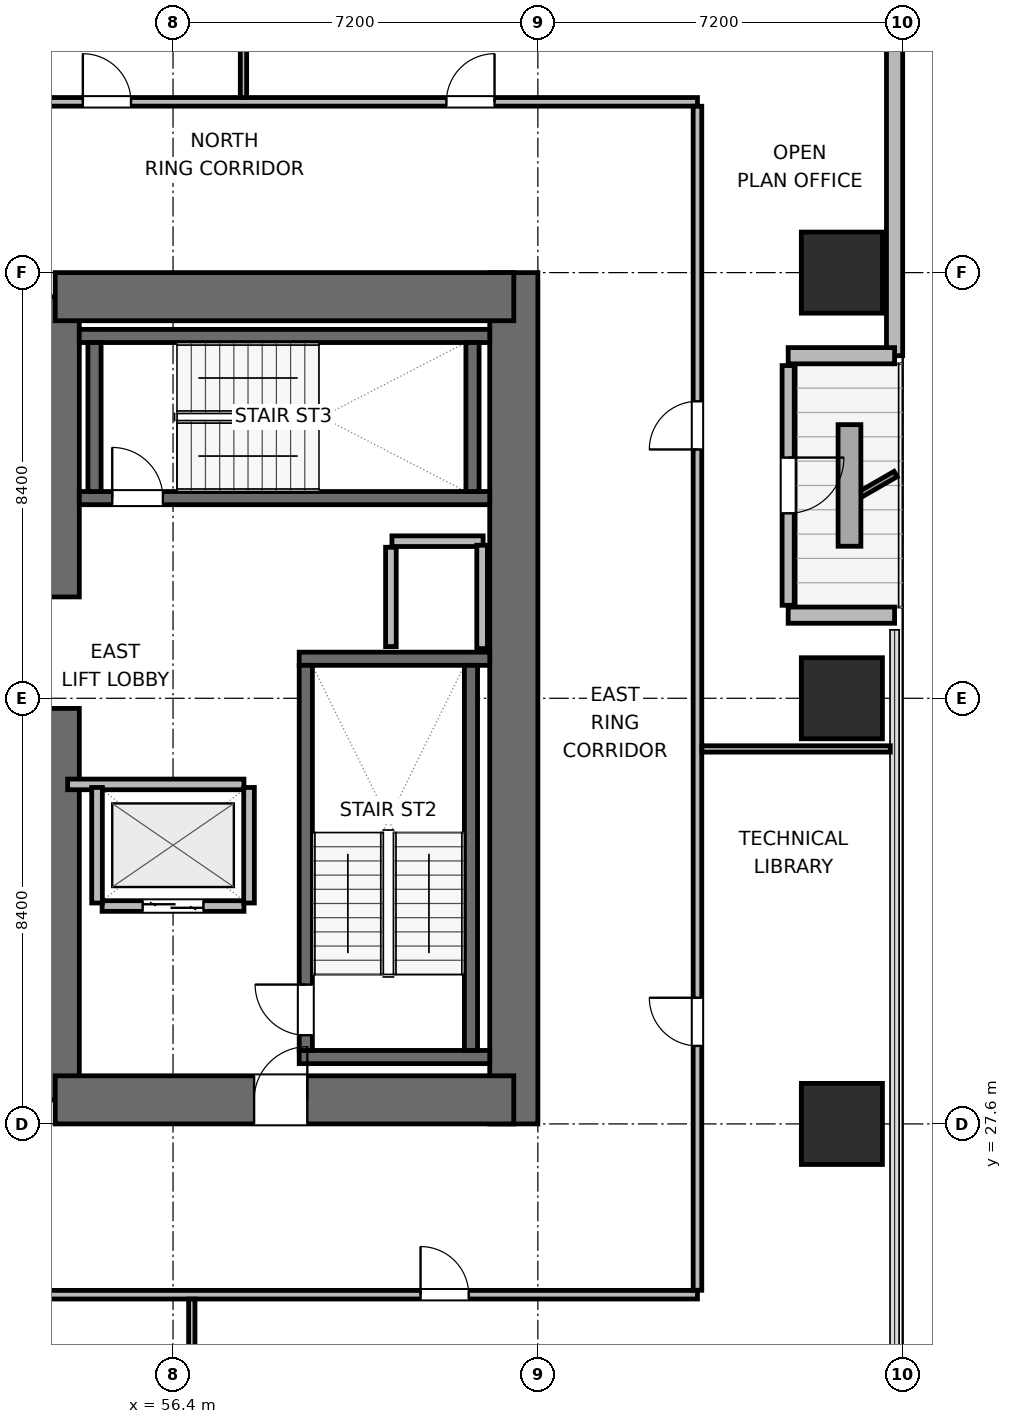
"""IFC4 building model, lengths in metres.
Left out: names, types, materials, properties, quantities, classifications, styles, units other than length and angle.
Written with IfcOpenShell. Run it as: python <this file> out.ifc"""

import sys

from ifc_helpers import new_model, si_unit, direction, frame, frame_2d, origin, origin_2d, place, context, subcontext, project, spatial, rectangle, extrude, element, fill, save


model = new_model("IFC4")
c1 = context("Model", 3, precision=1e-05, world=origin(), true_north=direction((0.0, 1.0)))
c2 = subcontext(c1, "Body", "Model", "MODEL_VIEW")
j1 = project(units=[si_unit("LENGTHUNIT", "METRE"), si_unit("PLANEANGLEUNIT", "RADIAN")], contexts=[c1])
p1 = place(None, origin())
s1 = spatial("IfcSite", under=j1, at=p1, CompositionType="ELEMENT")
p2 = place(p1, origin())
s2 = spatial("IfcBuilding", under=s1, at=p2, CompositionType="ELEMENT")
p3 = place(p2, frame((0.0, 0.0, 89.7)))
s3 = spatial("IfcBuildingStorey", under=s2, at=p3, CompositionType="ELEMENT", Elevation=89.7)
p4 = place(p3, frame((54.075, 28.075, 0.0), z_axis=(0.0, 0.0, 1.0), x_axis=(0.0, 1.0, 0.0)))
e1 = element("IfcWall", 1, at=p4, inside=s3, PredefinedType="SHEAR", context=c2, shape_type="SweptSolid", body=[
    extrude(rectangle(XDim=7.725, YDim=0.95, at=frame_2d((3.863, 0.0))), origin(), (0.0, 0.0, 1.0), 3.9),
])
p5 = place(p3, frame((54.075, 38.0, 0.0), z_axis=(0.0, 0.0, 1.0), x_axis=(0.0, 1.0, 0.0)))
e2 = element("IfcWall", 2, at=p5, inside=s3, PredefinedType="SHEAR", context=c2, shape_type="SweptSolid", body=[
    extrude(rectangle(XDim=5.925, YDim=0.95, at=frame_2d((2.962, 0.0))), origin(), (0.0, 0.0, 1.0), 3.9),
])
p6 = place(p3, frame((63.125, 27.6, 0.0), z_axis=(0.0, 0.0, 1.0), x_axis=(0.0, 1.0, 0.0)))
e3 = element("IfcWall", 3, at=p6, inside=s3, PredefinedType="SHEAR", context=c2, shape_type="SweptSolid", body=[
    extrude(rectangle(XDim=16.8, YDim=0.95, at=frame_2d((8.4, 0.0))), origin(), (0.0, 0.0, 1.0), 3.9),
])
p7 = place(p3, frame((54.075, 28.075, 0.0), z_axis=(0.0, 0.0, 1.0), x_axis=(1.0, 0.0, 0.0)))
e4 = element("IfcWall", 4, at=p7, inside=s3, PredefinedType="SHEAR", context=c2, shape_type="SweptSolid", body=[
    extrude(rectangle(XDim=9.05, YDim=0.95, at=frame_2d((4.525, 0.0))), origin(), (0.0, 0.0, 1.0), 3.9),
])
p8 = place(p7, frame((3.925, 0.0, 0.0)))
e5 = element("IfcOpeningElement", 5, at=p8, cuts=e4, PredefinedType="OPENING", context=c2, shape_type="SweptSolid", body=[
    extrude(rectangle(XDim=1.05, YDim=2.04, at=frame_2d((0.525, 1.02))), frame((0.0, 0.485, 0.0), z_axis=(0.0, -1.0, 0.0), x_axis=(1.0, 0.0, 0.0)), (0.0, 0.0, 1.0), 0.97),
])
p9 = place(p3, frame((54.075, 43.925, 0.0), z_axis=(0.0, 0.0, 1.0), x_axis=(1.0, 0.0, 0.0)))
e6 = element("IfcWall", 6, at=p9, inside=s3, PredefinedType="SHEAR", context=c2, shape_type="SweptSolid", body=[
    extrude(rectangle(XDim=9.05, YDim=0.95, at=frame_2d((4.525, 0.0))), origin(), (0.0, 0.0, 1.0), 3.9),
])
for number, where, z_axis, x_axis in (
    (7, (58.89, 28.92, 0.0), (0.0, 0.0, 1.0), (1.0, 0.0, 0.0)),
    (8, (58.89, 36.78, 0.0), (0.0, 0.0, 1.0), (1.0, 0.0, 0.0)),
):
    element("IfcWall", number, at=place(p3, frame(where, z_axis=z_axis, x_axis=x_axis)), inside=s3, PredefinedType="SHEAR", context=c2, shape_type="SweptSolid", body=[
        extrude(rectangle(XDim=3.76, YDim=0.26, at=frame_2d((1.88, 0.0))), origin(), (0.0, 0.0, 1.0), 3.9),
    ])
p10 = place(p3, frame((59.02, 29.05, 0.0), z_axis=(0.0, 0.0, 1.0), x_axis=(0.0, 1.0, 0.0)))
e9 = element("IfcWall", 9, at=p10, inside=s3, PredefinedType="SHEAR", context=c2, shape_type="SweptSolid", body=[
    extrude(rectangle(XDim=7.6, YDim=0.26, at=frame_2d((3.8, 0.0))), origin(), (0.0, 0.0, 1.0), 3.9),
])
p11 = place(p10, frame((0.3, 0.0, 0.0)))
e10 = element("IfcOpeningElement", 10, at=p11, cuts=e9, PredefinedType="OPENING", context=c2, shape_type="SweptSolid", body=[
    extrude(rectangle(XDim=1.0, YDim=2.04, at=frame_2d((0.5, 1.02))), frame((0.0, 0.14, 0.0), z_axis=(0.0, -1.0, 0.0), x_axis=(1.0, 0.0, 0.0)), (0.0, 0.0, 1.0), 0.28),
])
p12 = place(p3, frame((62.28, 29.05, 0.0), z_axis=(0.0, 0.0, 1.0), x_axis=(0.0, 1.0, 0.0)))
e11 = element("IfcWall", 11, at=p12, inside=s3, PredefinedType="SHEAR", context=c2, shape_type="SweptSolid", body=[
    extrude(rectangle(XDim=7.6, YDim=0.26, at=frame_2d((3.8, 0.0))), origin(), (0.0, 0.0, 1.0), 3.9),
])
p13 = place(p3, frame((54.55, 39.95, 0.0), z_axis=(0.0, 0.0, 1.0), x_axis=(1.0, 0.0, 0.0)))
e12 = element("IfcWall", 12, at=p13, inside=s3, PredefinedType="SHEAR", context=c2, shape_type="SweptSolid", body=[
    extrude(rectangle(XDim=8.1, YDim=0.26, at=frame_2d((4.05, 0.0))), origin(), (0.0, 0.0, 1.0), 3.9),
])
p14 = place(p13, frame((0.65, 0.0, 0.0)))
e13 = element("IfcOpeningElement", 13, at=p14, cuts=e12, PredefinedType="OPENING", context=c2, shape_type="SweptSolid", body=[
    extrude(rectangle(XDim=1.0, YDim=2.04, at=frame_2d((0.5, 1.02))), frame((0.0, 0.14, 0.0), z_axis=(0.0, -1.0, 0.0), x_axis=(1.0, 0.0, 0.0)), (0.0, 0.0, 1.0), 0.28),
])
p15 = place(p3, frame((54.55, 43.15, 0.0), z_axis=(0.0, 0.0, 1.0), x_axis=(1.0, 0.0, 0.0)))
e14 = element("IfcWall", 14, at=p15, inside=s3, PredefinedType="SHEAR", context=c2, shape_type="SweptSolid", body=[
    extrude(rectangle(XDim=8.1, YDim=0.26, at=frame_2d((4.05, 0.0))), origin(), (0.0, 0.0, 1.0), 3.9),
])
for number, where, z_axis, x_axis in (
    (15, (54.85, 40.08, 0.0), (0.0, 0.0, 1.0), (0.0, 1.0, 0.0)),
    (16, (62.31, 40.08, 0.0), (0.0, 0.0, 1.0), (0.0, 1.0, 0.0)),
):
    element("IfcWall", number, at=place(p3, frame(where, z_axis=z_axis, x_axis=x_axis)), inside=s3, PredefinedType="SHEAR", context=c2, shape_type="SweptSolid", body=[
        extrude(rectangle(XDim=2.94, YDim=0.26, at=frame_2d((1.47, 0.0))), origin(), (0.0, 0.0, 1.0), 3.9),
    ])
for number, where, z_axis, x_axis in (
    (17, (69.6, 27.6, 0.0), (0.0, 0.0, 1.0), (1.0, 0.0, 0.0)),
    (18, (69.6, 36.0, 0.0), (0.0, 0.0, 1.0), (1.0, 0.0, 0.0)),
    (19, (69.6, 44.4, 0.0), (0.0, 0.0, 1.0), (1.0, 0.0, 0.0)),
):
    element("IfcColumn", number, at=place(p3, frame(where, z_axis=z_axis, x_axis=x_axis)), inside=s3, PredefinedType="COLUMN", context=c2, shape_type="SweptSolid", body=[
        extrude(rectangle(XDim=1.6, YDim=1.6, at=origin_2d()), origin(), (0.0, 0.0, 1.0), 3.9),
    ])
p16 = place(p3, frame((70.64, 56.979, 0.0), z_axis=(0.0, 0.0, 1.0), x_axis=(0.0, -1.0, 0.0)))
e20 = element("IfcWall", 20, at=p16, inside=s3, PredefinedType="SOLIDWALL", context=c2, shape_type="SweptSolid", body=[
    extrude(rectangle(XDim=14.219, YDim=0.32, at=frame_2d((7.109, 0.0))), origin(), (0.0, 0.0, 1.0), 3.64),
])
p17 = place(p3, frame((70.64, 42.76, 0.0), z_axis=(0.0, 0.0, 1.0), x_axis=(-1.0, 0.0, 0.0)))
e21 = element("IfcWall", 21, at=p17, inside=s3, PredefinedType="SOLIDWALL", context=c2, shape_type="SweptSolid", body=[
    extrude(rectangle(XDim=2.1, YDim=0.32, at=frame_2d((1.05, 0.0))), origin(), (0.0, 0.0, 1.0), 2.875),
])
p18 = place(p3, frame((68.54, 42.565, 0.0), z_axis=(0.0, 0.0, 1.0), x_axis=(0.0, -1.0, 0.0)))
e22 = element("IfcWall", 22, at=p18, inside=s3, PredefinedType="SOLIDWALL", context=c2, shape_type="SweptSolid", body=[
    extrude(rectangle(XDim=4.73, YDim=0.24, at=frame_2d((2.365, 0.0))), origin(), (0.0, 0.0, 1.0), 3.162),
])
p19 = place(p18, frame((1.815, 0.0, 0.0)))
e23 = element("IfcOpeningElement", 23, at=p19, cuts=e22, PredefinedType="OPENING", context=c2, shape_type="SweptSolid", body=[
    extrude(rectangle(XDim=1.1, YDim=2.04, at=frame_2d((0.55, 1.02))), frame((0.0, 0.13, 0.0), z_axis=(0.0, -1.0, 0.0), x_axis=(1.0, 0.0, 0.0)), (0.0, 0.0, 1.0), 0.26),
])
p20 = place(p3, frame((68.54, 37.64, 0.0), z_axis=(0.0, 0.0, 1.0), x_axis=(1.0, 0.0, 0.0)))
e24 = element("IfcWall", 24, at=p20, inside=s3, PredefinedType="SOLIDWALL", context=c2, shape_type="SweptSolid", body=[
    extrude(rectangle(XDim=2.1, YDim=0.32, at=frame_2d((1.05, 0.0))), origin(), (0.0, 0.0, 1.0), 2.875),
])
p21 = place(p3, frame((60.72, 39.1, 0.0), z_axis=(0.0, 0.0, 1.0), x_axis=(1.0, 0.0, 0.0)))
e25 = element("IfcWall", 25, at=p21, inside=s3, PredefinedType="PARTITIONING", context=c2, shape_type="SweptSolid", body=[
    extrude(rectangle(XDim=1.8, YDim=0.21, at=frame_2d((0.9, 0.0))), origin(), (0.0, 0.0, 1.0), 3.64),
])
p22 = place(p3, frame((60.7, 37.02, 0.0), z_axis=(0.0, 0.0, 1.0), x_axis=(0.0, 1.0, 0.0)))
e26 = element("IfcWall", 26, at=p22, inside=s3, PredefinedType="PARTITIONING", context=c2, shape_type="SweptSolid", body=[
    extrude(rectangle(XDim=1.96, YDim=0.21, at=frame_2d((0.98, 0.0))), origin(), (0.0, 0.0, 1.0), 3.64),
])
p23 = place(p3, frame((62.5, 36.98, 0.0), z_axis=(0.0, 0.0, 1.0), x_axis=(0.0, 1.0, 0.0)))
e27 = element("IfcWall", 27, at=p23, inside=s3, PredefinedType="PARTITIONING", context=c2, shape_type="SweptSolid", body=[
    extrude(rectangle(XDim=2.04, YDim=0.21, at=frame_2d((1.02, 0.0))), origin(), (0.0, 0.0, 1.0), 3.64),
])
p24 = place(p3, frame((55.0, 31.9, 0.0), z_axis=(0.0, 0.0, 1.0), x_axis=(1.0, 0.0, 0.0)))
e28 = element("IfcWall", 28, at=p24, inside=s3, PredefinedType="PARTITIONING", context=c2, shape_type="SweptSolid", body=[
    extrude(rectangle(XDim=2.8, YDim=0.21, at=frame_2d((1.4, 0.0))), origin(), (0.0, 0.0, 1.0), 3.64),
])
p25 = place(p24, frame((0.8, 0.0, 0.0)))
e29 = element("IfcOpeningElement", 29, at=p25, cuts=e28, PredefinedType="OPENING", context=c2, shape_type="SweptSolid", body=[
    extrude(rectangle(XDim=1.2, YDim=2.04, at=frame_2d((0.6, 1.02))), frame((0.0, 0.115, 0.0), z_axis=(0.0, -1.0, 0.0), x_axis=(1.0, 0.0, 0.0)), (0.0, 0.0, 1.0), 0.23),
])
p26 = place(p3, frame((54.32, 34.3, 0.0), z_axis=(0.0, 0.0, 1.0), x_axis=(1.0, 0.0, 0.0)))
e30 = element("IfcWall", 30, at=p26, inside=s3, PredefinedType="PARTITIONING", context=c2, shape_type="SweptSolid", body=[
    extrude(rectangle(XDim=3.48, YDim=0.21, at=frame_2d((1.74, 0.0))), origin(), (0.0, 0.0, 1.0), 3.64),
])
for number, where, z_axis, x_axis in (
    (31, (54.9, 31.96, 0.0), (0.0, 0.0, 1.0), (0.0, 1.0, 0.0)),
    (32, (57.9, 31.96, 0.0), (0.0, 0.0, 1.0), (0.0, 1.0, 0.0)),
):
    element("IfcWall", number, at=place(p3, frame(where, z_axis=z_axis, x_axis=x_axis)), inside=s3, PredefinedType="PARTITIONING", context=c2, shape_type="SweptSolid", body=[
        extrude(rectangle(XDim=2.28, YDim=0.21, at=frame_2d((1.14, 0.0))), origin(), (0.0, 0.0, 1.0), 3.64),
    ])
p27 = place(p3, frame((29.25, 24.23, 0.0), z_axis=(0.0, 0.0, 1.0), x_axis=(1.0, 0.0, 0.0)))
e33 = element("IfcWall", 33, at=p27, inside=s3, PredefinedType="PARTITIONING", context=c2, shape_type="SweptSolid", body=[
    extrude(rectangle(XDim=37.5, YDim=0.17, at=frame_2d((18.75, 0.0))), origin(), (0.0, 0.0, 1.0), 3.64),
])
p28 = place(p27, frame((4.51, 0.0, 0.0)))
e34 = element("IfcOpeningElement", 34, at=p28, cuts=e33, PredefinedType="OPENING", context=c2, shape_type="SweptSolid", body=[
    extrude(rectangle(XDim=0.95, YDim=2.04, at=frame_2d((0.475, 1.02))), frame((0.0, 0.095, 0.0), z_axis=(0.0, -1.0, 0.0), x_axis=(1.0, 0.0, 0.0)), (0.0, 0.0, 1.0), 0.19),
])
p29 = place(p27, frame((13.885, 0.0, 0.0)))
e35 = element("IfcOpeningElement", 35, at=p29, cuts=e33, PredefinedType="OPENING", context=c2, shape_type="SweptSolid", body=[
    extrude(rectangle(XDim=0.95, YDim=2.04, at=frame_2d((0.475, 1.02))), frame((0.0, 0.095, 0.0), z_axis=(0.0, -1.0, 0.0), x_axis=(1.0, 0.0, 0.0)), (0.0, 0.0, 1.0), 0.19),
])
p30 = place(p27, frame((22.66, 0.0, 0.0)))
e36 = element("IfcOpeningElement", 36, at=p30, cuts=e33, PredefinedType="OPENING", context=c2, shape_type="SweptSolid", body=[
    extrude(rectangle(XDim=0.95, YDim=2.04, at=frame_2d((0.475, 1.02))), frame((0.0, 0.095, 0.0), z_axis=(0.0, -1.0, 0.0), x_axis=(1.0, 0.0, 0.0)), (0.0, 0.0, 1.0), 0.19),
])
p31 = place(p27, frame((32.035, 0.0, 0.0)))
e37 = element("IfcOpeningElement", 37, at=p31, cuts=e33, PredefinedType="OPENING", context=c2, shape_type="SweptSolid", body=[
    extrude(rectangle(XDim=0.95, YDim=2.04, at=frame_2d((0.475, 1.02))), frame((0.0, 0.095, 0.0), z_axis=(0.0, -1.0, 0.0), x_axis=(1.0, 0.0, 0.0)), (0.0, 0.0, 1.0), 0.19),
])
p32 = place(p3, frame((29.25, 47.77, 0.0), z_axis=(0.0, 0.0, 1.0), x_axis=(1.0, 0.0, 0.0)))
e38 = element("IfcWall", 38, at=p32, inside=s3, PredefinedType="PARTITIONING", context=c2, shape_type="SweptSolid", body=[
    extrude(rectangle(XDim=37.5, YDim=0.17, at=frame_2d((18.75, 0.0))), origin(), (0.0, 0.0, 1.0), 3.64),
])
p33 = place(p32, frame((4.005, 0.0, 0.0)))
e39 = element("IfcOpeningElement", 39, at=p33, cuts=e38, PredefinedType="OPENING", context=c2, shape_type="SweptSolid", body=[
    extrude(rectangle(XDim=0.95, YDim=2.04, at=frame_2d((0.475, 1.02))), frame((0.0, 0.095, 0.0), z_axis=(0.0, -1.0, 0.0), x_axis=(1.0, 0.0, 0.0)), (0.0, 0.0, 1.0), 0.19),
])
p34 = place(p32, frame((10.07, 0.0, 0.0)))
e40 = element("IfcOpeningElement", 40, at=p34, cuts=e38, PredefinedType="OPENING", context=c2, shape_type="SweptSolid", body=[
    extrude(rectangle(XDim=0.95, YDim=2.04, at=frame_2d((0.475, 1.02))), frame((0.0, 0.095, 0.0), z_axis=(0.0, -1.0, 0.0), x_axis=(1.0, 0.0, 0.0)), (0.0, 0.0, 1.0), 0.19),
])
p35 = place(p32, frame((17.165, 0.0, 0.0)))
e41 = element("IfcOpeningElement", 41, at=p35, cuts=e38, PredefinedType="OPENING", context=c2, shape_type="SweptSolid", body=[
    extrude(rectangle(XDim=0.95, YDim=2.04, at=frame_2d((0.475, 1.02))), frame((0.0, 0.095, 0.0), z_axis=(0.0, -1.0, 0.0), x_axis=(1.0, 0.0, 0.0)), (0.0, 0.0, 1.0), 0.19),
])
p36 = place(p32, frame((25.37, 0.0, 0.0)))
e42 = element("IfcOpeningElement", 42, at=p36, cuts=e38, PredefinedType="OPENING", context=c2, shape_type="SweptSolid", body=[
    extrude(rectangle(XDim=0.95, YDim=2.04, at=frame_2d((0.475, 1.02))), frame((0.0, 0.095, 0.0), z_axis=(0.0, -1.0, 0.0), x_axis=(1.0, 0.0, 0.0)), (0.0, 0.0, 1.0), 0.19),
])
p37 = place(p32, frame((32.545, 0.0, 0.0)))
e43 = element("IfcOpeningElement", 43, at=p37, cuts=e38, PredefinedType="OPENING", context=c2, shape_type="SweptSolid", body=[
    extrude(rectangle(XDim=0.95, YDim=2.04, at=frame_2d((0.475, 1.02))), frame((0.0, 0.095, 0.0), z_axis=(0.0, -1.0, 0.0), x_axis=(1.0, 0.0, 0.0)), (0.0, 0.0, 1.0), 0.19),
])
p38 = place(p3, frame((66.75, 24.317, 0.0), z_axis=(0.0, 0.0, 1.0), x_axis=(0.0, 1.0, 0.0)))
e44 = element("IfcWall", 44, at=p38, inside=s3, PredefinedType="PARTITIONING", context=c2, shape_type="SweptSolid", body=[
    extrude(rectangle(XDim=23.366, YDim=0.17, at=frame_2d((11.683, 0.0))), origin(), (0.0, 0.0, 1.0), 3.64),
])
p39 = place(p38, frame((4.823, 0.0, 0.0)))
e45 = element("IfcOpeningElement", 45, at=p39, cuts=e44, PredefinedType="OPENING", context=c2, shape_type="SweptSolid", body=[
    extrude(rectangle(XDim=0.95, YDim=2.04, at=frame_2d((0.475, 1.02))), frame((0.0, 0.095, 0.0), z_axis=(0.0, -1.0, 0.0), x_axis=(1.0, 0.0, 0.0)), (0.0, 0.0, 1.0), 0.19),
])
p40 = place(p38, frame((16.593, 0.0, 0.0)))
e46 = element("IfcOpeningElement", 46, at=p40, cuts=e44, PredefinedType="OPENING", context=c2, shape_type="SweptSolid", body=[
    extrude(rectangle(XDim=0.95, YDim=2.04, at=frame_2d((0.475, 1.02))), frame((0.0, 0.095, 0.0), z_axis=(0.0, -1.0, 0.0), x_axis=(1.0, 0.0, 0.0)), (0.0, 0.0, 1.0), 0.19),
])
for number, where, z_axis, x_axis in (
    (47, (56.77, 9.915, 0.0), (0.0, 0.0, 1.0), (0.0, 1.0, 0.0)),
    (48, (57.79, 47.857, 0.0), (0.0, 0.0, 1.0), (0.0, 1.0, 0.0)),
):
    element("IfcWall", number, at=place(p3, frame(where, z_axis=z_axis, x_axis=x_axis)), inside=s3, PredefinedType="PARTITIONING", context=c2, shape_type="SweptSolid", body=[
        extrude(rectangle(XDim=14.228, YDim=0.125, at=frame_2d((7.114, 0.0))), origin(), (0.0, 0.0, 1.0), 3.64),
    ])
p41 = place(p3, frame((66.837, 35.0, 0.0), z_axis=(0.0, 0.0, 1.0), x_axis=(1.0, 0.0, 0.0)))
e49 = element("IfcWall", 49, at=p41, inside=s3, PredefinedType="PARTITIONING", context=c2, shape_type="SweptSolid", body=[
    extrude(rectangle(XDim=3.718, YDim=0.125, at=frame_2d((1.859, 0.0))), origin(), (0.0, 0.0, 1.0), 3.64),
])
p42 = place(p19, origin())
e50 = element("IfcDoor", 50, at=p42, inside=s3, OperationType="SINGLE_SWING_LEFT", PredefinedType="DOOR", context=c2, shape_type="SweptSolid", body=[
    extrude(rectangle(XDim=1.1, YDim=2.04, at=frame_2d((0.55, 1.02))), frame((0.0, 0.025, 0.0), z_axis=(0.0, -1.0, 0.0), x_axis=(1.0, 0.0, 0.0)), (0.0, 0.0, 1.0), 0.05),
])
fill(e23, e50)
p43 = place(p11, origin())
e51 = element("IfcDoor", 51, at=p43, inside=s3, OperationType="SINGLE_SWING_RIGHT", PredefinedType="DOOR", context=c2, shape_type="SweptSolid", body=[
    extrude(rectangle(XDim=1.0, YDim=2.04, at=frame_2d((0.5, 1.02))), frame((0.0, 0.025, 0.0), z_axis=(0.0, -1.0, 0.0), x_axis=(1.0, 0.0, 0.0)), (0.0, 0.0, 1.0), 0.05),
])
fill(e10, e51)
p44 = place(p14, origin())
e52 = element("IfcDoor", 52, at=p44, inside=s3, OperationType="SINGLE_SWING_LEFT", PredefinedType="DOOR", context=c2, shape_type="SweptSolid", body=[
    extrude(rectangle(XDim=1.0, YDim=2.04, at=frame_2d((0.5, 1.02))), frame((0.0, 0.025, 0.0), z_axis=(0.0, -1.0, 0.0), x_axis=(1.0, 0.0, 0.0)), (0.0, 0.0, 1.0), 0.05),
])
fill(e13, e52)
p45 = place(p25, origin())
e53 = element("IfcDoor", 53, at=p45, inside=s3, OperationType="DOUBLE_DOOR_SLIDING", PredefinedType="DOOR", context=c2, shape_type="SweptSolid", body=[
    extrude(rectangle(XDim=1.2, YDim=2.04, at=frame_2d((0.6, 1.02))), frame((0.0, 0.025, 0.0), z_axis=(0.0, -1.0, 0.0), x_axis=(1.0, 0.0, 0.0)), (0.0, 0.0, 1.0), 0.05),
])
fill(e29, e53)
p46 = place(p8, origin())
e54 = element("IfcDoor", 54, at=p46, inside=s3, OperationType="SINGLE_SWING_RIGHT", PredefinedType="DOOR", context=c2, shape_type="SweptSolid", body=[
    extrude(rectangle(XDim=1.05, YDim=2.04, at=frame_2d((0.525, 1.02))), frame((0.0, 0.025, 0.0), z_axis=(0.0, -1.0, 0.0), x_axis=(1.0, 0.0, 0.0)), (0.0, 0.0, 1.0), 0.05),
])
fill(e5, e54)
p47 = place(p31, origin())
e55 = element("IfcDoor", 55, at=p47, inside=s3, OperationType="SINGLE_SWING_LEFT", PredefinedType="DOOR", context=c2, shape_type="SweptSolid", body=[
    extrude(rectangle(XDim=0.95, YDim=2.04, at=frame_2d((0.475, 1.02))), frame((0.0, 0.025, 0.0), z_axis=(0.0, -1.0, 0.0), x_axis=(1.0, 0.0, 0.0)), (0.0, 0.0, 1.0), 0.05),
])
fill(e37, e55)
p48 = place(p36, origin())
e56 = element("IfcDoor", 56, at=p48, inside=s3, OperationType="SINGLE_SWING_LEFT", PredefinedType="DOOR", context=c2, shape_type="SweptSolid", body=[
    extrude(rectangle(XDim=0.95, YDim=2.04, at=frame_2d((0.475, 1.02))), frame((0.0, 0.025, 0.0), z_axis=(0.0, -1.0, 0.0), x_axis=(1.0, 0.0, 0.0)), (0.0, 0.0, 1.0), 0.05),
])
fill(e42, e56)
p49 = place(p37, origin())
e57 = element("IfcDoor", 57, at=p49, inside=s3, OperationType="SINGLE_SWING_RIGHT", PredefinedType="DOOR", context=c2, shape_type="SweptSolid", body=[
    extrude(rectangle(XDim=0.95, YDim=2.04, at=frame_2d((0.475, 1.02))), frame((0.0, 0.025, 0.0), z_axis=(0.0, -1.0, 0.0), x_axis=(1.0, 0.0, 0.0)), (0.0, 0.0, 1.0), 0.05),
])
fill(e43, e57)
p50 = place(p39, origin())
e58 = element("IfcDoor", 58, at=p50, inside=s3, OperationType="SINGLE_SWING_RIGHT", PredefinedType="DOOR", context=c2, shape_type="SweptSolid", body=[
    extrude(rectangle(XDim=0.95, YDim=2.04, at=frame_2d((0.475, 1.02))), frame((0.0, 0.025, 0.0), z_axis=(0.0, -1.0, 0.0), x_axis=(1.0, 0.0, 0.0)), (0.0, 0.0, 1.0), 0.05),
])
fill(e45, e58)
p51 = place(p40, origin())
e59 = element("IfcDoor", 59, at=p51, inside=s3, OperationType="SINGLE_SWING_LEFT", PredefinedType="DOOR", context=c2, shape_type="SweptSolid", body=[
    extrude(rectangle(XDim=0.95, YDim=2.04, at=frame_2d((0.475, 1.02))), frame((0.0, 0.025, 0.0), z_axis=(0.0, -1.0, 0.0), x_axis=(1.0, 0.0, 0.0)), (0.0, 0.0, 1.0), 0.05),
])
fill(e46, e59)
save(model, sys.argv[1])
